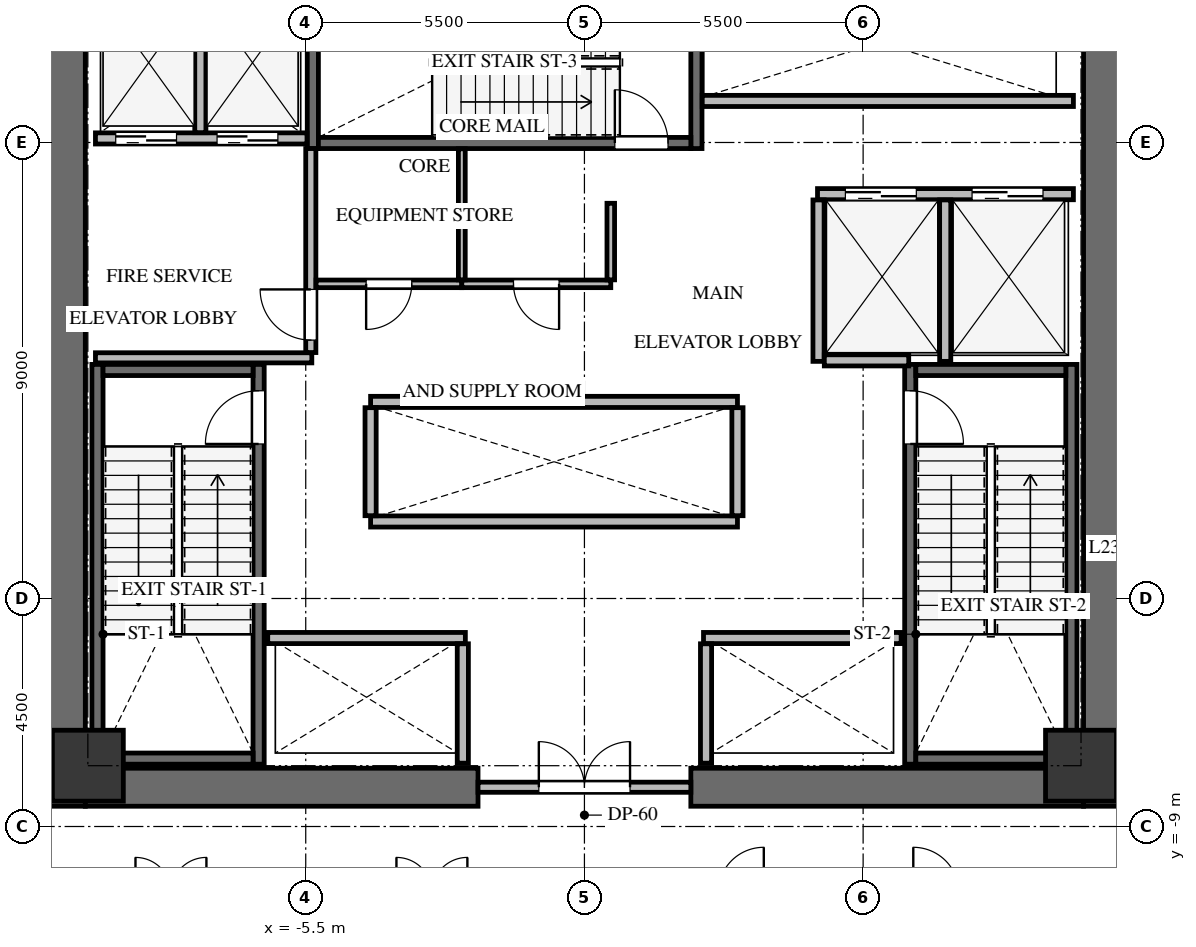
"""IFC4 building model, lengths in metres.
Left out: names, types, materials, properties, quantities, classifications, styles, units other than length and angle.
Written with IfcOpenShell. Run it as: python <this file> out.ifc"""

import sys

from ifc_helpers import new_model, si_unit, direction, frame, frame_2d, origin, origin_2d, place, context, subcontext, project, spatial, rectangle, extrude, source, transform, mapped, element, fill, save


model = new_model("IFC4")
c1 = context("Model", 3, precision=1e-05, world=origin(), true_north=direction((0.0, 1.0)))
c2 = subcontext(c1, "Body", "Model", "MODEL_VIEW")
j1 = project(units=[si_unit("LENGTHUNIT", "METRE"), si_unit("PLANEANGLEUNIT", "RADIAN")], contexts=[c1])
p1 = place(None, origin())
s1 = spatial("IfcSite", under=j1, at=p1, CompositionType="ELEMENT")
p2 = place(p1, origin())
s2 = spatial("IfcBuilding", under=s1, at=p2, CompositionType="ELEMENT")
p3 = place(p2, frame((0.0, 0.0, 88.5)))
s3 = spatial("IfcBuildingStorey", under=s2, at=p3, CompositionType="ELEMENT", Elevation=88.5)
for number, where, z_axis, x_axis in (
    (1, (-10.225, -8.6, 0.0), (0.0, 0.0, 1.0), (0.0, 1.0, 0.0)),
    (2, (10.225, -8.6, 0.0), (0.0, 0.0, 1.0), (0.0, 1.0, 0.0)),
):
    element("IfcWall", number, at=place(p3, frame(where, z_axis=z_axis, x_axis=x_axis)), inside=s3, PredefinedType="SHEAR", context=c2, shape_type="SweptSolid", body=[
        extrude(rectangle(XDim=17.2, YDim=0.75, at=frame_2d((8.6, 0.0))), origin(), (0.0, 0.0, 1.0), 4.8),
    ])
for number, where, z_axis, x_axis in (
    (3, (-9.85, -8.225, 0.0), (0.0, 0.0, 1.0), (1.0, 0.0, 0.0)),
    (4, (2.1, -8.225, 0.0), (0.0, 0.0, 1.0), (1.0, 0.0, 0.0)),
):
    element("IfcWall", number, at=place(p3, frame(where, z_axis=z_axis, x_axis=x_axis)), inside=s3, PredefinedType="SHEAR", context=c2, shape_type="SweptSolid", body=[
        extrude(rectangle(XDim=7.75, YDim=0.75, at=frame_2d((3.875, 0.0))), origin(), (0.0, 0.0, 1.0), 4.8),
    ])
p4 = place(p3, frame((-6.43, -7.77, -0.3), z_axis=(0.0, 0.0, 1.0), x_axis=(0.0, 1.0, 0.0)))
e5 = element("IfcWall", 5, at=p4, inside=s3, PredefinedType="SHEAR", context=c2, shape_type="SweptSolid", body=[
    extrude(rectangle(XDim=7.89, YDim=0.22, at=frame_2d((3.945, 0.0))), origin(), (0.0, 0.0, 1.0), 4.8),
])
p5 = place(p4, frame((6.32, 0.0, 0.0)))
e6 = element("IfcOpeningElement", 6, at=p5, cuts=e5, PredefinedType="OPENING", context=c2, shape_type="SweptSolid", body=[
    extrude(rectangle(XDim=1.05, YDim=2.15, at=frame_2d((0.525, 1.075))), frame((0.0, 0.12, 0.0), z_axis=(0.0, -1.0, 0.0), x_axis=(1.0, 0.0, 0.0)), (0.0, 0.0, 1.0), 0.24),
])
p6 = place(p3, frame((-9.61, 0.12, -0.3), z_axis=(0.0, 0.0, 1.0), x_axis=(0.0, -1.0, 0.0)))
e7 = element("IfcWall", 7, at=p6, inside=s3, PredefinedType="SHEAR", context=c2, shape_type="SweptSolid", body=[
    extrude(rectangle(XDim=7.89, YDim=0.22, at=frame_2d((3.945, 0.0))), origin(), (0.0, 0.0, 1.0), 4.8),
])
for number, where, z_axis, x_axis in (
    (8, (-9.5, -7.66, -0.3), (0.0, 0.0, 1.0), (1.0, 0.0, 0.0)),
    (9, (-6.54, 0.01, -0.3), (0.0, 0.0, 1.0), (-1.0, 0.0, 0.0)),
):
    element("IfcWall", number, at=place(p3, frame(where, z_axis=z_axis, x_axis=x_axis)), inside=s3, PredefinedType="SHEAR", context=c2, shape_type="SweptSolid", body=[
        extrude(rectangle(XDim=2.96, YDim=0.22, at=frame_2d((1.48, 0.0))), origin(), (0.0, 0.0, 1.0), 4.8),
    ])
p7 = place(p3, frame((9.61, -7.77, -0.3), z_axis=(0.0, 0.0, 1.0), x_axis=(0.0, 1.0, 0.0)))
e10 = element("IfcWall", 10, at=p7, inside=s3, PredefinedType="SHEAR", context=c2, shape_type="SweptSolid", body=[
    extrude(rectangle(XDim=7.89, YDim=0.22, at=frame_2d((3.945, 0.0))), origin(), (0.0, 0.0, 1.0), 4.8),
])
p8 = place(p3, frame((6.43, 0.12, -0.3), z_axis=(0.0, 0.0, 1.0), x_axis=(0.0, -1.0, 0.0)))
e11 = element("IfcWall", 11, at=p8, inside=s3, PredefinedType="SHEAR", context=c2, shape_type="SweptSolid", body=[
    extrude(rectangle(XDim=7.89, YDim=0.22, at=frame_2d((3.945, 0.0))), origin(), (0.0, 0.0, 1.0), 4.8),
])
p9 = place(p8, frame((0.52, 0.0, 0.0)))
e12 = element("IfcOpeningElement", 12, at=p9, cuts=e11, PredefinedType="OPENING", context=c2, shape_type="SweptSolid", body=[
    extrude(rectangle(XDim=1.05, YDim=2.15, at=frame_2d((0.525, 1.075))), frame((0.0, 0.12, 0.0), z_axis=(0.0, -1.0, 0.0), x_axis=(1.0, 0.0, 0.0)), (0.0, 0.0, 1.0), 0.24),
])
for number, where, z_axis, x_axis in (
    (13, (6.54, -7.66, -0.3), (0.0, 0.0, 1.0), (1.0, 0.0, 0.0)),
    (14, (9.5, 0.01, -0.3), (0.0, 0.0, 1.0), (-1.0, 0.0, 0.0)),
):
    element("IfcWall", number, at=place(p3, frame(where, z_axis=z_axis, x_axis=x_axis)), inside=s3, PredefinedType="SHEAR", context=c2, shape_type="SweptSolid", body=[
        extrude(rectangle(XDim=2.96, YDim=0.22, at=frame_2d((1.48, 0.0))), origin(), (0.0, 0.0, 1.0), 4.8),
    ])
for number, where, z_axis, x_axis in (
    (15, (2.21, 4.38, -0.3), (0.0, 0.0, 1.0), (0.0, 1.0, 0.0)),
    (16, (-5.36, 7.78, -0.3), (0.0, 0.0, 1.0), (0.0, -1.0, 0.0)),
):
    element("IfcWall", number, at=place(p3, frame(where, z_axis=z_axis, x_axis=x_axis)), inside=s3, PredefinedType="SHEAR", context=c2, shape_type="SweptSolid", body=[
        extrude(rectangle(XDim=3.4, YDim=0.22, at=frame_2d((1.7, 0.0))), origin(), (0.0, 0.0, 1.0), 4.8),
    ])
p10 = place(p3, frame((-5.25, 4.49, -0.3), z_axis=(0.0, 0.0, 1.0), x_axis=(1.0, 0.0, 0.0)))
e17 = element("IfcWall", 17, at=p10, inside=s3, PredefinedType="SHEAR", context=c2, shape_type="SweptSolid", body=[
    extrude(rectangle(XDim=7.35, YDim=0.22, at=frame_2d((3.675, 0.0))), origin(), (0.0, 0.0, 1.0), 4.8),
])
p11 = place(p10, frame((5.85, 0.0, 0.0)))
e18 = element("IfcOpeningElement", 18, at=p11, cuts=e17, PredefinedType="OPENING", context=c2, shape_type="SweptSolid", body=[
    extrude(rectangle(XDim=1.05, YDim=2.15, at=frame_2d((0.525, 1.075))), frame((0.0, 0.12, 0.0), z_axis=(0.0, -1.0, 0.0), x_axis=(1.0, 0.0, 0.0)), (0.0, 0.0, 1.0), 0.24),
])
m1 = source(origin(), c2, "Body", "SweptSolid", [
    extrude(rectangle(XDim=1.4, YDim=1.4, at=origin_2d()), origin(), (0.0, 0.0, 1.0), 4.8),
])
for number, where, z_axis, x_axis in (
    (19, (-9.8, -7.8, -0.3), (0.0, 0.0, 1.0), (1.0, 0.0, 0.0)),
    (20, (9.8, -7.8, -0.3), (0.0, 0.0, 1.0), (1.0, 0.0, 0.0)),
):
    element("IfcColumn", number, at=place(p3, frame(where, z_axis=z_axis, x_axis=x_axis)), inside=s3, PredefinedType="COLUMN", context=c2, shape_type="MappedRepresentation", body=[
        mapped(m1, transform((0.0, 0.0, 0.0), x_axis=(1.0, 0.0, 0.0), y_axis=(0.0, 1.0, 0.0), z_axis=(0.0, 0.0, 1.0), scale=1.0)),
    ])
p12 = place(p3, frame((-2.1, -8.225, 0.0), z_axis=(0.0, 0.0, 1.0), x_axis=(1.0, 0.0, 0.0)))
e21 = element("IfcWall", 21, at=p12, inside=s3, PredefinedType="SOLIDWALL", context=c2, shape_type="SweptSolid", body=[
    extrude(rectangle(XDim=4.2, YDim=0.2, at=frame_2d((2.1, 0.0))), origin(), (0.0, 0.0, 1.0), 4.485),
])
p13 = place(p12, frame((1.2, 0.0, 0.0)))
e22 = element("IfcOpeningElement", 22, at=p13, cuts=e21, PredefinedType="OPENING", context=c2, shape_type="SweptSolid", body=[
    extrude(rectangle(XDim=1.8, YDim=2.15, at=frame_2d((0.9, 1.075))), frame((0.0, 0.11, 0.0), z_axis=(0.0, -1.0, 0.0), x_axis=(1.0, 0.0, 0.0)), (0.0, 0.0, 1.0), 0.22),
])
p14 = place(p3, frame((-9.65, 4.58, 0.0), z_axis=(0.0, 0.0, 1.0), x_axis=(1.0, 0.0, 0.0)))
e23 = element("IfcWall", 23, at=p14, inside=s3, PredefinedType="SOLIDWALL", context=c2, shape_type="SweptSolid", body=[
    extrude(rectangle(XDim=4.175, YDim=0.22, at=frame_2d((2.087, 0.0))), origin(), (0.0, 0.0, 1.0), 4.485),
])
p15 = place(p14, frame((0.4, 0.0, 0.0)))
e24 = element("IfcOpeningElement", 24, at=p15, cuts=e23, PredefinedType="OPENING", context=c2, shape_type="SweptSolid", body=[
    extrude(rectangle(XDim=1.2, YDim=2.15, at=frame_2d((0.6, 1.075))), frame((0.0, 0.12, 0.0), z_axis=(0.0, -1.0, 0.0), x_axis=(1.0, 0.0, 0.0)), (0.0, 0.0, 1.0), 0.24),
])
p16 = place(p14, frame((2.4, 0.0, 0.0)))
e25 = element("IfcOpeningElement", 25, at=p16, cuts=e23, PredefinedType="OPENING", context=c2, shape_type="SweptSolid", body=[
    extrude(rectangle(XDim=1.2, YDim=2.15, at=frame_2d((0.6, 1.075))), frame((0.0, 0.12, 0.0), z_axis=(0.0, -1.0, 0.0), x_axis=(1.0, 0.0, 0.0)), (0.0, 0.0, 1.0), 0.24),
])
p17 = place(p3, frame((-7.58, 4.694, 0.0), z_axis=(0.0, 0.0, 1.0), x_axis=(0.0, 1.0, 0.0)))
e26 = element("IfcWall", 26, at=p17, inside=s3, PredefinedType="SOLIDWALL", context=c2, shape_type="SweptSolid", body=[
    extrude(rectangle(XDim=2.906, YDim=0.22, at=frame_2d((1.453, 0.0))), origin(), (0.0, 0.0, 1.0), 4.485),
])
p18 = place(p3, frame((-9.65, 0.25, 0.0), z_axis=(0.0, 0.0, 1.0), x_axis=(1.0, 0.0, 0.0)))
e27 = element("IfcWall", 27, at=p18, inside=s3, PredefinedType="SOLIDWALL", context=c2, shape_type="SweptSolid", body=[
    extrude(rectangle(XDim=4.27, YDim=0.2, at=frame_2d((2.135, 0.0))), origin(), (0.0, 0.0, 1.0), 4.485),
])
p19 = place(p3, frame((-5.4, 0.354, 0.0), z_axis=(0.0, 0.0, 1.0), x_axis=(0.0, 1.0, 0.0)))
e28 = element("IfcWall", 28, at=p19, inside=s3, PredefinedType="SOLIDWALL", context=c2, shape_type="SweptSolid", body=[
    extrude(rectangle(XDim=4.026, YDim=0.2, at=frame_2d((2.013, 0.0))), origin(), (0.0, 0.0, 1.0), 4.485),
])
p20 = place(p19, frame((0.246, 0.0, 0.0)))
e29 = element("IfcOpeningElement", 29, at=p20, cuts=e28, PredefinedType="OPENING", context=c2, shape_type="SweptSolid", body=[
    extrude(rectangle(XDim=1.0, YDim=2.15, at=frame_2d((0.5, 1.075))), frame((0.0, 0.11, 0.0), z_axis=(0.0, -1.0, 0.0), x_axis=(1.0, 0.0, 0.0)), (0.0, 0.0, 1.0), 0.22),
])
p21 = place(p3, frame((4.6, 3.48, 0.0), z_axis=(0.0, 0.0, 1.0), x_axis=(1.0, 0.0, 0.0)))
e30 = element("IfcWall", 30, at=p21, inside=s3, PredefinedType="SOLIDWALL", context=c2, shape_type="SweptSolid", body=[
    extrude(rectangle(XDim=5.05, YDim=0.22, at=frame_2d((2.525, 0.0))), origin(), (0.0, 0.0, 1.0), 4.485),
])
p22 = place(p21, frame((0.55, 0.0, 0.0)))
e31 = element("IfcOpeningElement", 31, at=p22, cuts=e30, PredefinedType="OPENING", context=c2, shape_type="SweptSolid", body=[
    extrude(rectangle(XDim=1.4, YDim=2.15, at=frame_2d((0.7, 1.075))), frame((0.0, 0.12, 0.0), z_axis=(0.0, -1.0, 0.0), x_axis=(1.0, 0.0, 0.0)), (0.0, 0.0, 1.0), 0.24),
])
p23 = place(p21, frame((3.05, 0.0, 0.0)))
e32 = element("IfcOpeningElement", 32, at=p23, cuts=e30, PredefinedType="OPENING", context=c2, shape_type="SweptSolid", body=[
    extrude(rectangle(XDim=1.4, YDim=2.15, at=frame_2d((0.7, 1.075))), frame((0.0, 0.12, 0.0), z_axis=(0.0, -1.0, 0.0), x_axis=(1.0, 0.0, 0.0)), (0.0, 0.0, 1.0), 0.24),
])
for number, where, z_axis, x_axis in (
    (33, (4.62, 0.18, 0.0), (0.0, 0.0, 1.0), (0.0, 1.0, 0.0)),
    (34, (7.12, 0.18, 0.0), (0.0, 0.0, 1.0), (0.0, 1.0, 0.0)),
):
    element("IfcWall", number, at=place(p3, frame(where, z_axis=z_axis, x_axis=x_axis)), inside=s3, PredefinedType="SOLIDWALL", context=c2, shape_type="SweptSolid", body=[
        extrude(rectangle(XDim=3.186, YDim=0.22, at=frame_2d((1.593, 0.0))), origin(), (0.0, 0.0, 1.0), 4.485),
    ])
p24 = place(p3, frame((4.734, 0.2, 0.0), z_axis=(0.0, 0.0, 1.0), x_axis=(1.0, 0.0, 0.0)))
e35 = element("IfcWall", 35, at=p24, inside=s3, PredefinedType="SOLIDWALL", context=c2, shape_type="SweptSolid", body=[
    extrude(rectangle(XDim=1.666, YDim=0.22, at=frame_2d((0.833, 0.0))), origin(), (0.0, 0.0, 1.0), 4.485),
])
for number, where, z_axis, x_axis in (
    (36, (-6.25, -5.28, 0.0), (0.0, 0.0, 1.0), (1.0, 0.0, 0.0)),
    (37, (2.35, -5.28, 0.0), (0.0, 0.0, 1.0), (1.0, 0.0, 0.0)),
):
    element("IfcWall", number, at=place(p3, frame(where, z_axis=z_axis, x_axis=x_axis)), inside=s3, PredefinedType="SOLIDWALL", context=c2, shape_type="SweptSolid", body=[
        extrude(rectangle(XDim=3.9, YDim=0.22, at=frame_2d((1.95, 0.0))), origin(), (0.0, 0.0, 1.0), 4.485),
    ])
for number, where, z_axis, x_axis in (
    (38, (-2.4, -7.75, 0.0), (0.0, 0.0, 1.0), (0.0, 1.0, 0.0)),
    (39, (2.4, -7.75, 0.0), (0.0, 0.0, 1.0), (0.0, 1.0, 0.0)),
):
    element("IfcWall", number, at=place(p3, frame(where, z_axis=z_axis, x_axis=x_axis)), inside=s3, PredefinedType="SOLIDWALL", context=c2, shape_type="SweptSolid", body=[
        extrude(rectangle(XDim=2.356, YDim=0.22, at=frame_2d((1.178, 0.0))), origin(), (0.0, 0.0, 1.0), 4.485),
    ])
for number, where, z_axis, x_axis in (
    (40, (-4.22, -2.98, 0.0), (0.0, 0.0, 1.0), (1.0, 0.0, 0.0)),
    (41, (-4.22, -0.62, 0.0), (0.0, 0.0, 1.0), (1.0, 0.0, 0.0)),
):
    element("IfcWall", number, at=place(p3, frame(where, z_axis=z_axis, x_axis=x_axis)), inside=s3, PredefinedType="SOLIDWALL", context=c2, shape_type="SweptSolid", body=[
        extrude(rectangle(XDim=7.24, YDim=0.22, at=frame_2d((3.62, 0.0))), origin(), (0.0, 0.0, 1.0), 4.485),
    ])
for number, where, z_axis, x_axis in (
    (42, (-4.22, -2.866, 0.0), (0.0, 0.0, 1.0), (0.0, 1.0, 0.0)),
    (43, (3.02, -2.866, 0.0), (0.0, 0.0, 1.0), (0.0, 1.0, 0.0)),
):
    element("IfcWall", number, at=place(p3, frame(where, z_axis=z_axis, x_axis=x_axis)), inside=s3, PredefinedType="SOLIDWALL", context=c2, shape_type="SweptSolid", body=[
        extrude(rectangle(XDim=2.132, YDim=0.22, at=frame_2d((1.066, 0.0))), origin(), (0.0, 0.0, 1.0), 4.485),
    ])
p25 = place(p3, frame((2.325, 5.32, 0.0), z_axis=(0.0, 0.0, 1.0), x_axis=(1.0, 0.0, 0.0)))
e44 = element("IfcWall", 44, at=p25, inside=s3, PredefinedType="SOLIDWALL", context=c2, shape_type="SweptSolid", body=[
    extrude(rectangle(XDim=7.325, YDim=0.22, at=frame_2d((3.663, 0.0))), origin(), (0.0, 0.0, 1.0), 4.485),
])
p26 = place(p3, frame((-2.42, 1.71, 0.0), z_axis=(0.0, 0.0, 1.0), x_axis=(-1.0, 0.0, 0.0)))
e45 = element("IfcWall", 45, at=p26, inside=s3, PredefinedType="PARTITIONING", context=c2, shape_type="SweptSolid", body=[
    extrude(rectangle(XDim=2.876, YDim=0.15, at=frame_2d((1.438, 0.0))), origin(), (0.0, 0.0, 1.0), 4.485),
])
p27 = place(p26, frame((0.988, 0.0, 0.0)))
e46 = element("IfcOpeningElement", 46, at=p27, cuts=e45, PredefinedType="OPENING", context=c2, shape_type="SweptSolid", body=[
    extrude(rectangle(XDim=0.9, YDim=2.05, at=frame_2d((0.45, 1.025))), frame((0.0, 0.085, 0.0), z_axis=(0.0, -1.0, 0.0), x_axis=(1.0, 0.0, 0.0)), (0.0, 0.0, 1.0), 0.17),
])
p28 = place(p3, frame((0.52, 1.71, 0.0), z_axis=(0.0, 0.0, 1.0), x_axis=(-1.0, 0.0, 0.0)))
e47 = element("IfcWall", 47, at=p28, inside=s3, PredefinedType="PARTITIONING", context=c2, shape_type="SweptSolid", body=[
    extrude(rectangle(XDim=2.94, YDim=0.15, at=frame_2d((1.47, 0.0))), origin(), (0.0, 0.0, 1.0), 4.485),
])
p29 = place(p28, frame((1.02, 0.0, 0.0)))
e48 = element("IfcOpeningElement", 48, at=p29, cuts=e47, PredefinedType="OPENING", context=c2, shape_type="SweptSolid", body=[
    extrude(rectangle(XDim=0.9, YDim=2.05, at=frame_2d((0.45, 1.025))), frame((0.0, 0.085, 0.0), z_axis=(0.0, -1.0, 0.0), x_axis=(1.0, 0.0, 0.0)), (0.0, 0.0, 1.0), 0.17),
])
p30 = place(p3, frame((0.52, 3.3, 0.0), z_axis=(0.0, 0.0, 1.0), x_axis=(0.0, -1.0, 0.0)))
e49 = element("IfcWall", 49, at=p30, inside=s3, PredefinedType="PARTITIONING", context=c2, shape_type="SweptSolid", body=[
    extrude(rectangle(XDim=1.511, YDim=0.15, at=frame_2d((0.755, 0.0))), origin(), (0.0, 0.0, 1.0), 4.485),
])
p31 = place(p3, frame((-2.42, 4.375, 0.0), z_axis=(0.0, 0.0, 1.0), x_axis=(0.0, -1.0, 0.0)))
e50 = element("IfcWall", 50, at=p31, inside=s3, PredefinedType="PARTITIONING", context=c2, shape_type="SweptSolid", body=[
    extrude(rectangle(XDim=2.586, YDim=0.135, at=frame_2d((1.293, 0.0))), origin(), (0.0, 0.0, 1.0), 4.485),
])
m2 = source(origin(), c2, "Body", "SweptSolid", [
    extrude(rectangle(XDim=1.05, YDim=2.15, at=frame_2d((0.525, 1.075))), frame((0.0, 0.025, 0.0), z_axis=(0.0, -1.0, 0.0), x_axis=(1.0, 0.0, 0.0)), (0.0, 0.0, 1.0), 0.05),
])
p32 = place(p5, origin())
e51 = element("IfcDoor", 51, at=p32, inside=s3, OperationType="SINGLE_SWING_LEFT", PredefinedType="DOOR", context=c2, shape_type="MappedRepresentation", body=[
    mapped(m2, transform((0.0, 0.0, 0.0), x_axis=(1.0, 0.0, 0.0), y_axis=(0.0, 1.0, 0.0), z_axis=(0.0, 0.0, 1.0), scale=1.0)),
])
fill(e6, e51)
m3 = source(origin(), c2, "Body", "SweptSolid", [
    extrude(rectangle(XDim=1.05, YDim=2.15, at=frame_2d((0.525, 1.075))), frame((0.0, 0.025, 0.0), z_axis=(0.0, -1.0, 0.0), x_axis=(1.0, 0.0, 0.0)), (0.0, 0.0, 1.0), 0.05),
])
p33 = place(p9, origin())
e52 = element("IfcDoor", 52, at=p33, inside=s3, OperationType="SINGLE_SWING_RIGHT", PredefinedType="DOOR", context=c2, shape_type="MappedRepresentation", body=[
    mapped(m3, transform((0.0, 0.0, 0.0), x_axis=(1.0, 0.0, 0.0), y_axis=(0.0, 1.0, 0.0), z_axis=(0.0, 0.0, 1.0), scale=1.0)),
])
fill(e12, e52)
p34 = place(p11, origin())
e53 = element("IfcDoor", 53, at=p34, inside=s3, OperationType="SINGLE_SWING_LEFT", PredefinedType="DOOR", context=c2, shape_type="MappedRepresentation", body=[
    mapped(m2, transform((0.0, 0.0, 0.0), x_axis=(1.0, 0.0, 0.0), y_axis=(0.0, 1.0, 0.0), z_axis=(0.0, 0.0, 1.0), scale=1.0)),
])
fill(e18, e53)
m4 = source(origin(), c2, "Body", "SweptSolid", [
    extrude(rectangle(XDim=1.8, YDim=2.15, at=frame_2d((0.9, 1.075))), frame((0.0, 0.025, 0.0), z_axis=(0.0, -1.0, 0.0), x_axis=(1.0, 0.0, 0.0)), (0.0, 0.0, 1.0), 0.05),
])
p35 = place(p13, origin())
e54 = element("IfcDoor", 54, at=p35, inside=s3, OperationType="DOUBLE_DOOR_SINGLE_SWING", PredefinedType="DOOR", context=c2, shape_type="MappedRepresentation", body=[
    mapped(m4, transform((0.0, 0.0, 0.0), x_axis=(1.0, 0.0, 0.0), y_axis=(0.0, 1.0, 0.0), z_axis=(0.0, 0.0, 1.0), scale=1.0)),
])
fill(e22, e54)
m5 = source(origin(), c2, "Body", "SweptSolid", [
    extrude(rectangle(XDim=1.2, YDim=2.15, at=frame_2d((0.6, 1.075))), frame((0.0, 0.025, 0.0), z_axis=(0.0, -1.0, 0.0), x_axis=(1.0, 0.0, 0.0)), (0.0, 0.0, 1.0), 0.05),
])
p36 = place(p15, origin())
e55 = element("IfcDoor", 55, at=p36, inside=s3, OperationType="DOUBLE_DOOR_SLIDING", PredefinedType="DOOR", context=c2, shape_type="MappedRepresentation", body=[
    mapped(m5, transform((0.0, 0.0, 0.0), x_axis=(1.0, 0.0, 0.0), y_axis=(0.0, 1.0, 0.0), z_axis=(0.0, 0.0, 1.0), scale=1.0)),
])
fill(e24, e55)
p37 = place(p16, origin())
e56 = element("IfcDoor", 56, at=p37, inside=s3, OperationType="DOUBLE_DOOR_SLIDING", PredefinedType="DOOR", context=c2, shape_type="MappedRepresentation", body=[
    mapped(m5, transform((0.0, 0.0, 0.0), x_axis=(1.0, 0.0, 0.0), y_axis=(0.0, 1.0, 0.0), z_axis=(0.0, 0.0, 1.0), scale=1.0)),
])
fill(e25, e56)
m6 = source(origin(), c2, "Body", "SweptSolid", [
    extrude(rectangle(XDim=1.0, YDim=2.15, at=frame_2d((0.5, 1.075))), frame((0.0, 0.025, 0.0), z_axis=(0.0, -1.0, 0.0), x_axis=(1.0, 0.0, 0.0)), (0.0, 0.0, 1.0), 0.05),
])
p38 = place(p20, origin())
e57 = element("IfcDoor", 57, at=p38, inside=s3, OperationType="SINGLE_SWING_RIGHT", PredefinedType="DOOR", context=c2, shape_type="MappedRepresentation", body=[
    mapped(m6, transform((0.0, 0.0, 0.0), x_axis=(1.0, 0.0, 0.0), y_axis=(0.0, 1.0, 0.0), z_axis=(0.0, 0.0, 1.0), scale=1.0)),
])
fill(e29, e57)
m7 = source(origin(), c2, "Body", "SweptSolid", [
    extrude(rectangle(XDim=1.4, YDim=2.15, at=frame_2d((0.7, 1.075))), frame((0.0, 0.025, 0.0), z_axis=(0.0, -1.0, 0.0), x_axis=(1.0, 0.0, 0.0)), (0.0, 0.0, 1.0), 0.05),
])
p39 = place(p22, origin())
e58 = element("IfcDoor", 58, at=p39, inside=s3, OperationType="DOUBLE_DOOR_SLIDING", PredefinedType="DOOR", context=c2, shape_type="MappedRepresentation", body=[
    mapped(m7, transform((0.0, 0.0, 0.0), x_axis=(1.0, 0.0, 0.0), y_axis=(0.0, 1.0, 0.0), z_axis=(0.0, 0.0, 1.0), scale=1.0)),
])
fill(e31, e58)
p40 = place(p23, origin())
e59 = element("IfcDoor", 59, at=p40, inside=s3, OperationType="DOUBLE_DOOR_SLIDING", PredefinedType="DOOR", context=c2, shape_type="MappedRepresentation", body=[
    mapped(m7, transform((0.0, 0.0, 0.0), x_axis=(1.0, 0.0, 0.0), y_axis=(0.0, 1.0, 0.0), z_axis=(0.0, 0.0, 1.0), scale=1.0)),
])
fill(e32, e59)
m8 = source(origin(), c2, "Body", "SweptSolid", [
    extrude(rectangle(XDim=0.9, YDim=2.05, at=frame_2d((0.45, 1.025))), frame((0.0, 0.025, 0.0), z_axis=(0.0, -1.0, 0.0), x_axis=(1.0, 0.0, 0.0)), (0.0, 0.0, 1.0), 0.05),
])
p41 = place(p27, origin())
e60 = element("IfcDoor", 60, at=p41, inside=s3, OperationType="SINGLE_SWING_RIGHT", PredefinedType="DOOR", context=c2, shape_type="MappedRepresentation", body=[
    mapped(m8, transform((0.0, 0.0, 0.0), x_axis=(1.0, 0.0, 0.0), y_axis=(0.0, 1.0, 0.0), z_axis=(0.0, 0.0, 1.0), scale=1.0)),
])
fill(e46, e60)
m9 = source(origin(), c2, "Body", "SweptSolid", [
    extrude(rectangle(XDim=0.9, YDim=2.05, at=frame_2d((0.45, 1.025))), frame((0.0, 0.025, 0.0), z_axis=(0.0, -1.0, 0.0), x_axis=(1.0, 0.0, 0.0)), (0.0, 0.0, 1.0), 0.05),
])
p42 = place(p29, origin())
e61 = element("IfcDoor", 61, at=p42, inside=s3, OperationType="SINGLE_SWING_LEFT", PredefinedType="DOOR", context=c2, shape_type="MappedRepresentation", body=[
    mapped(m9, transform((0.0, 0.0, 0.0), x_axis=(1.0, 0.0, 0.0), y_axis=(0.0, 1.0, 0.0), z_axis=(0.0, 0.0, 1.0), scale=1.0)),
])
fill(e48, e61)
save(model, sys.argv[1])
